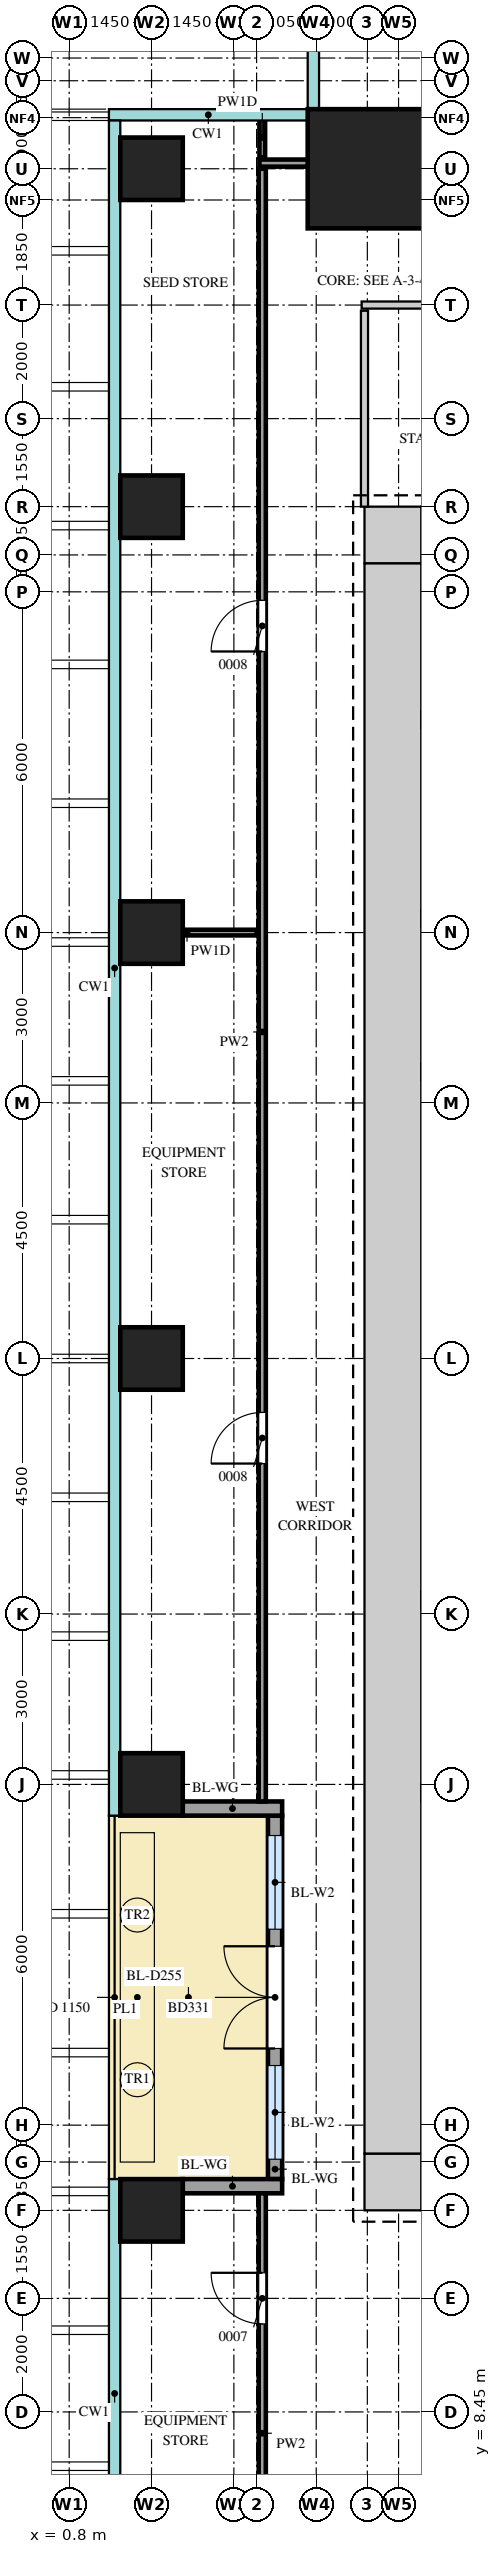
"""IFC4 building model, lengths in metres.
Left out: names, types, materials, properties, quantities, classifications, styles, units other than length and angle.
Written with IfcOpenShell. Run it as: python <this file> out.ifc"""

import sys

from ifc_helpers import new_model, si_unit, direction, frame, frame_2d, origin, origin_2d, place, context, subcontext, project, spatial, rectangle, extrude, source, transform, mapped, element, fill, save


model = new_model("IFC4")
c1 = context("Model", 3, precision=1e-05, world=origin(), true_north=direction((0.0, 1.0)))
c2 = subcontext(c1, "Body", "Model", "MODEL_VIEW")
j1 = project(units=[si_unit("LENGTHUNIT", "METRE"), si_unit("PLANEANGLEUNIT", "RADIAN")], contexts=[c1])
p1 = place(None, origin())
s1 = spatial("IfcSite", under=j1, at=p1, CompositionType="ELEMENT")
p2 = place(p1, origin())
s2 = spatial("IfcBuilding", under=s1, at=p2, CompositionType="ELEMENT")
p3 = place(p2, frame((0.0, 0.0, 154.3)))
s3 = spatial("IfcBuildingStorey", under=s2, at=p3, CompositionType="ELEMENT", Elevation=154.3)
m1 = source(origin(), c2, "Body", "SweptSolid", [
    extrude(rectangle(XDim=1.0, YDim=1.0, at=frame_2d((0.5, 0.0))), origin(), (0.0, 0.0, 1.0), 4.1),
])
for number, where, z_axis, x_axis in (
    (1, (6.0, 41.5, 0.0), (0.0, 0.0, 1.0), (1.0, 0.0, 0.0)),
    (2, (6.0, 12.5, 0.0), (0.0, 0.0, 1.0), (1.0, 0.0, 0.0)),
):
    element("IfcWall", number, at=place(p3, frame(where, z_axis=z_axis, x_axis=x_axis)), inside=s3, PredefinedType="SHEAR", context=c2, shape_type="MappedRepresentation", body=[
        mapped(m1, transform((0.0, 0.0, 0.0))),
    ])
m2 = source(origin(), c2, "Body", "SweptSolid", [
    extrude(rectangle(XDim=28.0, YDim=1.0, at=frame_2d((14.0, 0.0))), origin(), (0.0, 0.0, 1.0), 4.1),
])
p4 = place(p3, frame((6.5, 13.0, 0.0), z_axis=(0.0, 0.0, 1.0), x_axis=(0.0, 1.0, 0.0)))
e3 = element("IfcWall", 3, at=p4, inside=s3, PredefinedType="SHEAR", context=c2, shape_type="MappedRepresentation", body=[
    mapped(m2, transform((0.0, 0.0, 0.0))),
])
m3 = source(origin(), c2, "Body", "SweptSolid", [
    extrude(rectangle(XDim=2.1, YDim=2.1, at=origin_2d()), origin(), (0.0, 0.0, 1.0), 4.4),
])
p5 = place(p3, frame((6.05, 47.95, 0.0), z_axis=(0.0, 0.0, 1.0), x_axis=(1.0, 0.0, 0.0)))
e4 = element("IfcColumn", 4, at=p5, inside=s3, PredefinedType="COLUMN", context=c2, shape_type="MappedRepresentation", body=[
    mapped(m3, transform((0.0, 0.0, 0.0))),
])
m4 = source(origin(), c2, "Body", "SweptSolid", [
    extrude(rectangle(XDim=1.1, YDim=1.1, at=origin_2d()), origin(), (0.0, 0.0, 1.0), 4.4),
])
for number, where, z_axis, x_axis in (
    (5, (2.25, 12.0, 0.0), (0.0, 0.0, 1.0), (1.0, 0.0, 0.0)),
    (6, (2.25, 19.5, 0.0), (0.0, 0.0, 1.0), (1.0, 0.0, 0.0)),
    (7, (2.25, 27.0, 0.0), (0.0, 0.0, 1.0), (1.0, 0.0, 0.0)),
    (8, (2.25, 34.5, 0.0), (0.0, 0.0, 1.0), (1.0, 0.0, 0.0)),
    (9, (2.25, 42.0, 0.0), (0.0, 0.0, 1.0), (1.0, 0.0, 0.0)),
    (10, (2.25, 47.95, 0.0), (0.0, 0.0, 1.0), (1.0, 0.0, 0.0)),
):
    element("IfcColumn", number, at=place(p3, frame(where, z_axis=z_axis, x_axis=x_axis)), inside=s3, PredefinedType="COLUMN", context=c2, shape_type="MappedRepresentation", body=[
        mapped(m4, transform((0.0, 0.0, 0.0))),
    ])
m5 = source(origin(), c2, "Body", "SweptSolid", [
    extrude(rectangle(XDim=6.4, YDim=0.25, at=frame_2d((3.2, 0.0))), origin(), (0.0, 0.0, 1.0), 3.35),
])
p6 = place(p3, frame((4.425, 12.55, 0.0), z_axis=(0.0, 0.0, 1.0), x_axis=(0.0, 1.0, 0.0)))
e11 = element("IfcWall", 11, at=p6, inside=s3, PredefinedType="SOLIDWALL", context=c2, shape_type="MappedRepresentation", body=[
    mapped(m5, transform((0.0, 0.0, 0.0))),
])
m6 = source(origin(), c2, "Body", "SweptSolid", [
    extrude(rectangle(XDim=1.65, YDim=2.4, at=frame_2d((0.825, 1.2))), frame((0.0, 0.135, 0.0), z_axis=(0.0, -1.0, 0.0), x_axis=(1.0, 0.0, 0.0)), (0.0, 0.0, 1.0), 0.27),
])
p7 = place(p6, frame((0.35, 0.0, 0.0)))
e12 = element("IfcOpeningElement", 12, at=p7, cuts=e11, PredefinedType="OPENING", context=c2, shape_type="MappedRepresentation", body=[
    mapped(m6, transform((0.0, 0.0, 0.0))),
])
p8 = place(p6, frame((4.4, 0.0, 0.0)))
e13 = element("IfcOpeningElement", 13, at=p8, cuts=e11, PredefinedType="OPENING", context=c2, shape_type="MappedRepresentation", body=[
    mapped(m6, transform((0.0, 0.0, 0.0))),
])
m7 = source(origin(), c2, "Body", "SweptSolid", [
    extrude(rectangle(XDim=1.8, YDim=2.4, at=frame_2d((0.9, 1.2))), frame((0.0, 0.135, 0.0), z_axis=(0.0, -1.0, 0.0), x_axis=(1.0, 0.0, 0.0)), (0.0, 0.0, 1.0), 0.27),
])
p9 = place(p6, frame((2.3, 0.0, 0.0)))
e14 = element("IfcOpeningElement", 14, at=p9, cuts=e11, PredefinedType="OPENING", context=c2, shape_type="MappedRepresentation", body=[
    mapped(m7, transform((0.0, 0.0, 0.0))),
])
m8 = source(origin(), c2, "Body", "SweptSolid", [
    extrude(rectangle(XDim=1.75, YDim=0.25, at=frame_2d((0.875, 0.0))), origin(), (0.0, 0.0, 1.0), 3.35),
])
for number, where, z_axis, x_axis in (
    (15, (2.8, 12.425, 0.0), (0.0, 0.0, 1.0), (1.0, 0.0, 0.0)),
    (16, (2.8, 19.075, 0.0), (0.0, 0.0, 1.0), (1.0, 0.0, 0.0)),
):
    element("IfcWall", number, at=place(p3, frame(where, z_axis=z_axis, x_axis=x_axis)), inside=s3, PredefinedType="SOLIDWALL", context=c2, shape_type="MappedRepresentation", body=[
        mapped(m8, transform((0.0, 0.0, 0.0))),
    ])
m9 = source(origin(), c2, "Body", "SweptSolid", [
    extrude(rectangle(XDim=6.15, YDim=0.125, at=frame_2d((3.075, 0.0))), origin(), (0.0, 0.0, 1.0), 4.2),
])
p10 = place(p3, frame((4.2, 6.15, 0.0), z_axis=(0.0, 0.0, 1.0), x_axis=(0.0, 1.0, 0.0)))
e17 = element("IfcWall", 17, at=p10, inside=s3, PredefinedType="PARTITIONING", context=c2, shape_type="MappedRepresentation", body=[
    mapped(m9, transform((0.0, 0.0, 0.0))),
])
m10 = source(origin(), c2, "Body", "SweptSolid", [
    extrude(rectangle(XDim=0.9, YDim=2.1, at=frame_2d((0.45, 1.05))), frame((0.0, 0.073, 0.0), z_axis=(0.0, -1.0, 0.0), x_axis=(1.0, 0.0, 0.0)), (0.0, 0.0, 1.0), 0.145),
])
p11 = place(p10, frame((3.85, 0.0, 0.0)))
e18 = element("IfcOpeningElement", 18, at=p11, cuts=e17, PredefinedType="OPENING", context=c2, shape_type="MappedRepresentation", body=[
    mapped(m10, transform((0.0, 0.0, 0.0))),
])
m11 = source(origin(), c2, "Body", "SweptSolid", [
    extrude(rectangle(XDim=28.75, YDim=0.125, at=frame_2d((14.375, 0.0))), origin(), (0.0, 0.0, 1.0), 4.2),
])
p12 = place(p3, frame((4.2, 19.2, 0.0), z_axis=(0.0, 0.0, 1.0), x_axis=(0.0, 1.0, 0.0)))
e19 = element("IfcWall", 19, at=p12, inside=s3, PredefinedType="PARTITIONING", context=c2, shape_type="MappedRepresentation", body=[
    mapped(m11, transform((0.0, 0.0, 0.0))),
])
p13 = place(p12, frame((5.95, 0.0, 0.0)))
e20 = element("IfcOpeningElement", 20, at=p13, cuts=e19, PredefinedType="OPENING", context=c2, shape_type="MappedRepresentation", body=[
    mapped(m10, transform((0.0, 0.0, 0.0))),
])
p14 = place(p12, frame((20.25, 0.0, 0.0)))
e21 = element("IfcOpeningElement", 21, at=p14, cuts=e19, PredefinedType="OPENING", context=c2, shape_type="MappedRepresentation", body=[
    mapped(m10, transform((0.0, 0.0, 0.0))),
])
m12 = source(origin(), c2, "Body", "SweptSolid", [
    extrude(rectangle(XDim=2.45, YDim=0.1, at=frame_2d((1.225, 0.0))), origin(), (0.0, 0.0, 1.0), 4.2),
])
p15 = place(p3, frame((1.65, 34.5, 0.0), z_axis=(0.0, 0.0, 1.0), x_axis=(1.0, 0.0, 0.0)))
e22 = element("IfcWall", 22, at=p15, inside=s3, PredefinedType="PARTITIONING", context=c2, shape_type="MappedRepresentation", body=[
    mapped(m12, transform((0.0, 0.0, 0.0))),
])
m13 = source(origin(), c2, "Body", "SweptSolid", [
    extrude(rectangle(XDim=3.45, YDim=0.125, at=frame_2d((1.725, 0.0))), origin(), (0.0, 0.0, 1.0), 4.2),
])
p16 = place(p3, frame((6.0, 42.0, 0.0), z_axis=(0.0, 0.0, 1.0), x_axis=(0.0, 1.0, 0.0)))
e23 = element("IfcWall", 23, at=p16, inside=s3, PredefinedType="PARTITIONING", context=c2, shape_type="MappedRepresentation", body=[
    mapped(m13, transform((0.0, 0.0, 0.0))),
])
m14 = source(origin(), c2, "Body", "SweptSolid", [
    extrude(rectangle(XDim=7.95, YDim=0.125, at=frame_2d((3.975, 0.0))), origin(), (0.0, 0.0, 1.0), 4.2),
])
p17 = place(p3, frame((5.95, 45.55, 0.0), z_axis=(0.0, 0.0, 1.0), x_axis=(1.0, 0.0, 0.0)))
e24 = element("IfcWall", 24, at=p17, inside=s3, PredefinedType="PARTITIONING", context=c2, shape_type="MappedRepresentation", body=[
    mapped(m14, transform((0.0, 0.0, 0.0))),
])
p18 = place(p17, frame((1.55, 0.0, 0.0)))
e25 = element("IfcOpeningElement", 25, at=p18, cuts=e24, PredefinedType="OPENING", context=c2, shape_type="MappedRepresentation", body=[
    mapped(m10, transform((0.0, 0.0, 0.0))),
])
p19 = place(p17, frame((5.65, 0.0, 0.0)))
e26 = element("IfcOpeningElement", 26, at=p19, cuts=e24, PredefinedType="OPENING", context=c2, shape_type="MappedRepresentation", body=[
    mapped(m10, transform((0.0, 0.0, 0.0))),
])
m15 = source(origin(), c2, "Body", "SweptSolid", [
    extrude(rectangle(XDim=42.2, YDim=0.125, at=frame_2d((21.1, 0.0))), origin(), (0.0, 0.0, 1.0), 3.4),
])
p20 = place(p3, frame((4.15, 48.05, 0.0), z_axis=(0.0, 0.0, 1.0), x_axis=(1.0, 0.0, 0.0)))
e27 = element("IfcWall", 27, at=p20, inside=s3, PredefinedType="PARTITIONING", context=c2, shape_type="MappedRepresentation", body=[
    mapped(m15, transform((0.0, 0.0, 0.0))),
])
p21 = place(p20, frame((7.25, 0.0, 0.0)))
e28 = element("IfcOpeningElement", 28, at=p21, cuts=e27, PredefinedType="OPENING", context=c2, shape_type="MappedRepresentation", body=[
    mapped(m10, transform((0.0, 0.0, 0.0))),
])
p22 = place(p20, frame((22.55, 0.0, 0.0)))
e29 = element("IfcOpeningElement", 29, at=p22, cuts=e27, PredefinedType="OPENING", context=c2, shape_type="MappedRepresentation", body=[
    mapped(m10, transform((0.0, 0.0, 0.0))),
])
p23 = place(p20, frame((35.85, 0.0, 0.0)))
e30 = element("IfcOpeningElement", 30, at=p23, cuts=e27, PredefinedType="OPENING", context=c2, shape_type="MappedRepresentation", body=[
    mapped(m10, transform((0.0, 0.0, 0.0))),
])
m16 = source(origin(), c2, "Body", "SweptSolid", [
    extrude(rectangle(XDim=0.7, YDim=0.1, at=frame_2d((0.35, 0.0))), origin(), (0.0, 0.0, 1.0), 4.2),
])
p24 = place(p3, frame((4.2, 48.15, 0.0), z_axis=(0.0, 0.0, 1.0), x_axis=(0.0, 1.0, 0.0)))
e31 = element("IfcWall", 31, at=p24, inside=s3, PredefinedType="PARTITIONING", context=c2, shape_type="MappedRepresentation", body=[
    mapped(m16, transform((0.0, 0.0, 0.0))),
])
m17 = source(origin(), c2, "Body", "SweptSolid", [
    extrude(rectangle(XDim=1.65, YDim=2.4, at=frame_2d((0.825, 1.2))), frame((0.0, 0.03, 0.0), z_axis=(0.0, -1.0, 0.0), x_axis=(1.0, 0.0, 0.0)), (0.0, 0.0, 1.0), 0.06),
])
p25 = place(p7, origin())
e32 = element("IfcWindow", 32, at=p25, inside=s3, PartitioningType="SINGLE_PANEL", PredefinedType="WINDOW", context=c2, shape_type="MappedRepresentation", body=[
    mapped(m17, transform((0.0, 0.0, 0.0))),
])
fill(e12, e32)
p26 = place(p8, origin())
e33 = element("IfcWindow", 33, at=p26, inside=s3, PartitioningType="SINGLE_PANEL", PredefinedType="WINDOW", context=c2, shape_type="MappedRepresentation", body=[
    mapped(m17, transform((0.0, 0.0, 0.0))),
])
fill(e13, e33)
m18 = source(origin(), c2, "Body", "SweptSolid", [
    extrude(rectangle(XDim=1.8, YDim=2.4, at=frame_2d((0.9, 1.2))), frame((0.0, 0.025, 0.0), z_axis=(0.0, -1.0, 0.0), x_axis=(1.0, 0.0, 0.0)), (0.0, 0.0, 1.0), 0.05),
])
p27 = place(p9, origin())
e34 = element("IfcDoor", 34, at=p27, inside=s3, OperationType="DOUBLE_DOOR_DOUBLE_SWING", PredefinedType="DOOR", context=c2, shape_type="MappedRepresentation", body=[
    mapped(m18, transform((0.0, 0.0, 0.0))),
])
fill(e14, e34)
m19 = source(origin(), c2, "Body", "SweptSolid", [
    extrude(rectangle(XDim=0.9, YDim=2.1, at=frame_2d((0.45, 1.05))), frame((0.0, 0.025, 0.0), z_axis=(0.0, -1.0, 0.0), x_axis=(1.0, 0.0, 0.0)), (0.0, 0.0, 1.0), 0.05),
])
p28 = place(p11, origin())
e35 = element("IfcDoor", 35, at=p28, inside=s3, OperationType="SINGLE_SWING_LEFT", PredefinedType="DOOR", context=c2, shape_type="MappedRepresentation", body=[
    mapped(m19, transform((0.0, 0.0, 0.0))),
])
fill(e18, e35)
p29 = place(p13, origin())
e36 = element("IfcDoor", 36, at=p29, inside=s3, OperationType="SINGLE_SWING_RIGHT", PredefinedType="DOOR", context=c2, shape_type="MappedRepresentation", body=[
    mapped(m19, transform((0.0, 0.0, 0.0))),
])
fill(e20, e36)
p30 = place(p14, origin())
e37 = element("IfcDoor", 37, at=p30, inside=s3, OperationType="SINGLE_SWING_RIGHT", PredefinedType="DOOR", context=c2, shape_type="MappedRepresentation", body=[
    mapped(m19, transform((0.0, 0.0, 0.0))),
])
fill(e21, e37)
save(model, sys.argv[1])
